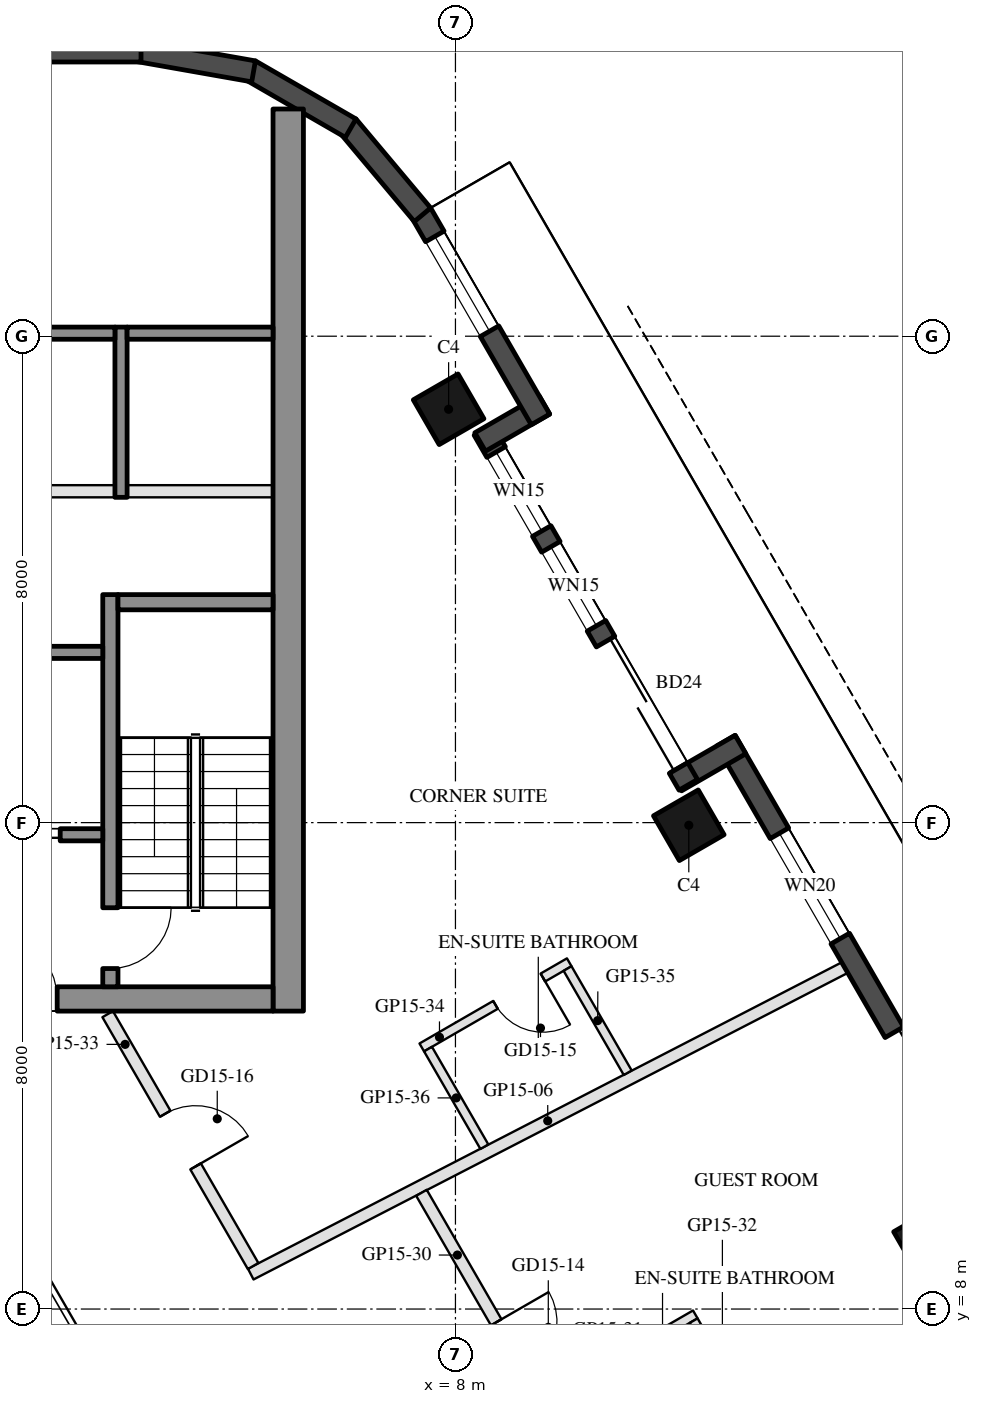
"""IFC4 building model, lengths in metres.
Left out: names, types, materials, properties, quantities, classifications, styles, units other than length and angle.
Written with IfcOpenShell. Run it as: python <this file> out.ifc"""

import sys

from ifc_helpers import new_model, si_unit, direction, frame, frame_2d, origin, origin_2d, place, context, subcontext, project, spatial, rectangle, hollow_rectangle, extrude, element, fill, save


model = new_model("IFC4")
c1 = context("Model", 3, precision=1e-05, world=origin(), true_north=direction((0.0, 1.0)))
c2 = subcontext(c1, "Body", "Model", "MODEL_VIEW")
j1 = project(units=[si_unit("LENGTHUNIT", "METRE"), si_unit("PLANEANGLEUNIT", "RADIAN")], contexts=[c1])
p1 = place(None, origin())
s1 = spatial("IfcSite", under=j1, at=p1, CompositionType="ELEMENT")
p2 = place(p1, origin())
s2 = spatial("IfcBuilding", under=s1, at=p2, CompositionType="ELEMENT")
p3 = place(p2, frame((0.0, 0.0, 172.5)))
s3 = spatial("IfcBuildingStorey", under=s2, at=p3, CompositionType="ELEMENT", Elevation=172.5)
for number, where, z_axis, x_axis in (
    (1, (15.788, 9.115, 0.0), (0.0, 0.0, 1.0), (-0.5, 0.866, 0.0)),
    (2, (11.838, 15.957, 0.0), (0.0, 0.0, 1.0), (-0.5, 0.866, 0.0)),
    (3, (7.888, 22.798, 0.0), (0.0, 0.0, 1.0), (-0.5, 0.866, 0.0)),
):
    element("IfcColumn", number, at=place(p3, frame(where, z_axis=z_axis, x_axis=x_axis)), inside=s3, PredefinedType="COLUMN", context=c2, shape_type="SweptSolid", body=[
        extrude(hollow_rectangle(XDim=0.85, YDim=0.85, WallThickness=0.04, at=origin_2d()), origin(), (0.0, 0.0, 1.0), 3.7),
    ])
p4 = place(p3, frame((17.299, 8.948, 0.0), z_axis=(0.0, 0.0, 1.0), x_axis=(-0.500010041276, 0.866019606374, 0.0)))
e4 = element("IfcWall", 4, at=p4, inside=s3, PredefinedType="SOLIDWALL", context=c2, shape_type="SweptSolid", body=[
    extrude(rectangle(XDim=9.7, YDim=0.35, at=frame_2d((4.85, 0.0))), origin(), (0.0, 0.0, 1.0), 3.55),
])
p5 = place(p4, frame((1.762, 0.0, 0.0)))
e5 = element("IfcOpeningElement", 5, at=p5, cuts=e4, PredefinedType="OPENING", context=c2, shape_type="SweptSolid", body=[
    extrude(rectangle(XDim=2.4, YDim=2.4, at=frame_2d((1.2, 1.2))), frame((0.0, 0.185, 0.0), z_axis=(0.0, -1.0, 0.0), x_axis=(1.0, 0.0, 0.0)), (0.0, 0.0, 1.0), 0.37),
])
p6 = place(p4, frame((5.941, 0.0, 0.3)))
e6 = element("IfcOpeningElement", 6, at=p6, cuts=e4, PredefinedType="OPENING", context=c2, shape_type="SweptSolid", body=[
    extrude(rectangle(XDim=2.0, YDim=2.65, at=frame_2d((1.0, 1.325))), frame((0.0, 0.185, 0.0), z_axis=(0.0, -1.0, 0.0), x_axis=(1.0, 0.0, 0.0)), (0.0, 0.0, 1.0), 0.37),
])
p7 = place(p3, frame((12.688, 17.284, 0.0), z_axis=(0.0, 0.0, 1.0), x_axis=(-0.865955602162, -0.500120880472, 0.0)))
e7 = element("IfcWall", 7, at=p7, inside=s3, PredefinedType="SOLIDWALL", context=c2, shape_type="SweptSolid", body=[
    extrude(rectangle(XDim=1.22, YDim=0.35, at=frame_2d((0.61, 0.0))), origin(), (0.0, 0.0, 1.0), 3.55),
])
p8 = place(p3, frame((11.829, 16.621, 0.0), z_axis=(0.0, 0.0, 1.0), x_axis=(-0.500003597184, 0.866023326939, 0.0)))
e8 = element("IfcWall", 8, at=p8, inside=s3, PredefinedType="SOLIDWALL", context=c2, shape_type="SweptSolid", body=[
    extrude(rectangle(XDim=6.74, YDim=0.35, at=frame_2d((3.37, 0.0))), origin(), (0.0, 0.0, 1.0), 3.55),
])
p9 = place(p8, frame((0.32, 0.0, 0.0)))
e9 = element("IfcOpeningElement", 9, at=p9, cuts=e8, PredefinedType="OPENING", context=c2, shape_type="SweptSolid", body=[
    extrude(rectangle(XDim=2.4, YDim=2.4, at=frame_2d((1.2, 1.2))), frame((0.0, 0.185, 0.0), z_axis=(0.0, -1.0, 0.0), x_axis=(1.0, 0.0, 0.0)), (0.0, 0.0, 1.0), 0.37),
])
p10 = place(p8, frame((3.02, 0.0, 0.3)))
e10 = element("IfcOpeningElement", 10, at=p10, cuts=e8, PredefinedType="OPENING", context=c2, shape_type="SweptSolid", body=[
    extrude(rectangle(XDim=1.5, YDim=2.65, at=frame_2d((0.75, 1.325))), frame((0.0, 0.185, 0.0), z_axis=(0.0, -1.0, 0.0), x_axis=(1.0, 0.0, 0.0)), (0.0, 0.0, 1.0), 0.37),
])
p11 = place(p8, frame((4.82, 0.0, 0.3)))
e11 = element("IfcOpeningElement", 11, at=p11, cuts=e8, PredefinedType="OPENING", context=c2, shape_type="SweptSolid", body=[
    extrude(rectangle(XDim=1.5, YDim=2.65, at=frame_2d((0.75, 1.325))), frame((0.0, 0.185, 0.0), z_axis=(0.0, -1.0, 0.0), x_axis=(1.0, 0.0, 0.0)), (0.0, 0.0, 1.0), 0.37),
])
p12 = place(p3, frame((8.406, 22.26, 0.0), z_axis=(0.0, 0.0, 1.0), x_axis=(0.865955602162, 0.500120880472, 0.0)))
e12 = element("IfcWall", 12, at=p12, inside=s3, PredefinedType="SOLIDWALL", context=c2, shape_type="SweptSolid", body=[
    extrude(rectangle(XDim=1.22, YDim=0.35, at=frame_2d((0.61, 0.0))), origin(), (0.0, 0.0, 1.0), 3.55),
])
p13 = place(p3, frame((9.398, 22.631, 0.0), z_axis=(0.0, 0.0, 1.0), x_axis=(-0.499954521343, 0.866051659307, 0.0)))
e13 = element("IfcWall", 13, at=p13, inside=s3, PredefinedType="SOLIDWALL", context=c2, shape_type="SweptSolid", body=[
    extrude(rectangle(XDim=3.916, YDim=0.35, at=frame_2d((1.958, 0.0))), origin(), (0.0, 0.0, 1.0), 3.55),
])
p14 = place(p13, frame((1.675, 0.0, 0.3)))
e14 = element("IfcOpeningElement", 14, at=p14, cuts=e13, PredefinedType="OPENING", context=c2, shape_type="SweptSolid", body=[
    extrude(rectangle(XDim=1.8, YDim=2.65, at=frame_2d((0.9, 1.325))), frame((0.0, 0.185, 0.0), z_axis=(0.0, -1.0, 0.0), x_axis=(1.0, 0.0, 0.0)), (0.0, 0.0, 1.0), 0.37),
])
p15 = place(p3, frame((7.458, 25.998, 0.0), z_axis=(0.0, 0.0, 1.0), x_axis=(-0.642808304945, 0.766027077259, 0.0)))
e15 = element("IfcWall", 15, at=p15, inside=s3, PredefinedType="SOLIDWALL", context=c2, shape_type="SweptSolid", body=[
    extrude(rectangle(XDim=1.91, YDim=0.35, at=frame_2d((0.955, 0.0))), origin(), (0.0, 0.0, 1.0), 3.55),
])
for number, where, z_axis, x_axis in (
    (16, (6.277, 27.422, 0.0), (0.0, 0.0, 1.0), (-0.866, 0.5, 0.0)),
    (17, (4.68, 28.356, 0.0), (0.0, 0.0, 1.0), (-0.985, 0.174, 0.0)),
):
    element("IfcWall", number, at=place(p3, frame(where, z_axis=z_axis, x_axis=x_axis)), inside=s3, PredefinedType="SOLIDWALL", context=c2, shape_type="SweptSolid", body=[
        extrude(rectangle(XDim=1.91, YDim=0.35, at=frame_2d((0.955, 0.0))), origin(), (0.0, 0.0, 1.0), 3.55),
    ])
p16 = place(p3, frame((2.829, 28.685, 0.0), z_axis=(0.0, 0.0, 1.0), x_axis=(-1.0, 0.0, 0.0)))
e18 = element("IfcWall", 18, at=p16, inside=s3, PredefinedType="SOLIDWALL", context=c2, shape_type="SweptSolid", body=[
    extrude(rectangle(XDim=5.658, YDim=0.35, at=frame_2d((2.829, 0.0))), origin(), (0.0, 0.0, 1.0), 3.55),
])
p17 = place(p3, frame((5.25, 12.9, 0.0), z_axis=(0.0, 0.0, 1.0), x_axis=(0.0, 1.0, 0.0)))
e19 = element("IfcWall", 19, at=p17, inside=s3, PredefinedType="SHEAR", context=c2, shape_type="SweptSolid", body=[
    extrude(rectangle(XDim=14.837, YDim=0.5, at=frame_2d((7.418, 0.0))), origin(), (0.0, 0.0, 1.0), 3.5),
])
p18 = place(p3, frame((5.0, 13.1, 0.0), z_axis=(0.0, 0.0, 1.0), x_axis=(-1.0, 0.0, 0.0)))
e20 = element("IfcWall", 20, at=p18, inside=s3, PredefinedType="SHEAR", context=c2, shape_type="SweptSolid", body=[
    extrude(rectangle(XDim=10.0, YDim=0.4, at=frame_2d((5.0, 0.0))), origin(), (0.0, 0.0, 1.0), 3.5),
])
p19 = place(p18, frame((3.55, 0.0, 0.0)))
e21 = element("IfcOpeningElement", 21, at=p19, cuts=e20, PredefinedType="OPENING", context=c2, shape_type="SweptSolid", body=[
    extrude(rectangle(XDim=1.1, YDim=2.1, at=frame_2d((0.55, 1.05))), frame((0.0, 0.21, 0.0), z_axis=(0.0, -1.0, 0.0), x_axis=(1.0, 0.0, 0.0)), (0.0, 0.0, 1.0), 0.42),
])
p20 = place(p18, frame((5.85, 0.0, 0.0)))
e22 = element("IfcOpeningElement", 22, at=p20, cuts=e20, PredefinedType="OPENING", context=c2, shape_type="SweptSolid", body=[
    extrude(rectangle(XDim=1.4, YDim=2.1, at=frame_2d((0.7, 1.05))), frame((0.0, 0.21, 0.0), z_axis=(0.0, -1.0, 0.0), x_axis=(1.0, 0.0, 0.0)), (0.0, 0.0, 1.0), 0.42),
])
p21 = place(p3, frame((2.325, 13.3, 0.0), z_axis=(0.0, 0.0, 1.0), x_axis=(0.0, 1.0, 0.0)))
e23 = element("IfcWall", 23, at=p21, inside=s3, PredefinedType="SHEAR", context=c2, shape_type="SweptSolid", body=[
    extrude(rectangle(XDim=6.45, YDim=0.25, at=frame_2d((3.225, 0.0))), origin(), (0.0, 0.0, 1.0), 3.5),
])
p22 = place(p21, frame((0.3, 0.0, 0.0)))
e24 = element("IfcOpeningElement", 24, at=p22, cuts=e23, PredefinedType="OPENING", context=c2, shape_type="SweptSolid", body=[
    extrude(rectangle(XDim=1.0, YDim=2.1, at=frame_2d((0.5, 1.05))), frame((0.0, 0.135, 0.0), z_axis=(0.0, -1.0, 0.0), x_axis=(1.0, 0.0, 0.0)), (0.0, 0.0, 1.0), 0.27),
])
p23 = place(p3, frame((5.0, 19.625, 0.0), z_axis=(0.0, 0.0, 1.0), x_axis=(-1.0, 0.0, 0.0)))
e25 = element("IfcWall", 25, at=p23, inside=s3, PredefinedType="SHEAR", context=c2, shape_type="SweptSolid", body=[
    extrude(rectangle(XDim=2.55, YDim=0.25, at=frame_2d((1.275, 0.0))), origin(), (0.0, 0.0, 1.0), 3.5),
])
p24 = place(p3, frame((2.2, 18.8, 0.0), z_axis=(0.0, 0.0, 1.0), x_axis=(-1.0, 0.0, 0.0)))
e26 = element("IfcWall", 26, at=p24, inside=s3, PredefinedType="SHEAR", context=c2, shape_type="SweptSolid", body=[
    extrude(rectangle(XDim=2.8, YDim=0.2, at=frame_2d((1.4, 0.0))), origin(), (0.0, 0.0, 1.0), 3.5),
])
p25 = place(p3, frame((2.2, 15.8, 0.0), z_axis=(0.0, 0.0, 1.0), x_axis=(-1.0, 0.0, 0.0)))
e27 = element("IfcWall", 27, at=p25, inside=s3, PredefinedType="SHEAR", context=c2, shape_type="SweptSolid", body=[
    extrude(rectangle(XDim=2.8, YDim=0.2, at=frame_2d((1.4, 0.0))), origin(), (0.0, 0.0, 1.0), 3.5),
])
p26 = place(p25, frame((0.7, 0.0, 0.0)))
e28 = element("IfcOpeningElement", 28, at=p26, cuts=e27, PredefinedType="OPENING", context=c2, shape_type="SweptSolid", body=[
    extrude(rectangle(XDim=1.2, YDim=2.1, at=frame_2d((0.6, 1.05))), frame((0.0, 0.11, 0.0), z_axis=(0.0, -1.0, 0.0), x_axis=(1.0, 0.0, 0.0)), (0.0, 0.0, 1.0), 0.22),
])
p27 = place(p3, frame((2.5, 21.35, 0.0), z_axis=(0.0, 0.0, 1.0), x_axis=(0.0, 1.0, 0.0)))
e29 = element("IfcWall", 29, at=p27, inside=s3, PredefinedType="SHEAR", context=c2, shape_type="SweptSolid", body=[
    extrude(rectangle(XDim=2.8, YDim=0.2, at=frame_2d((1.4, 0.0))), origin(), (0.0, 0.0, 1.0), 3.5),
])
p28 = place(p3, frame((5.0, 24.05, 0.0), z_axis=(0.0, 0.0, 1.0), x_axis=(-1.0, 0.0, 0.0)))
e30 = element("IfcWall", 30, at=p28, inside=s3, PredefinedType="SHEAR", context=c2, shape_type="SweptSolid", body=[
    extrude(rectangle(XDim=2.4, YDim=0.2, at=frame_2d((1.2, 0.0))), origin(), (0.0, 0.0, 1.0), 3.5),
])
p29 = place(p3, frame((2.4, 24.05, 0.0), z_axis=(0.0, 0.0, 1.0), x_axis=(-1.0, 0.0, 0.0)))
e31 = element("IfcWall", 31, at=p29, inside=s3, PredefinedType="SHEAR", context=c2, shape_type="SweptSolid", body=[
    extrude(rectangle(XDim=2.8, YDim=0.2, at=frame_2d((1.4, 0.0))), origin(), (0.0, 0.0, 1.0), 3.5),
])
p30 = place(p3, frame((5.0, 21.45, 0.0), z_axis=(0.0, 0.0, 1.0), x_axis=(-1.0, 0.0, 0.0)))
e32 = element("IfcWall", 32, at=p30, inside=s3, PredefinedType="PARTITIONING", context=c2, shape_type="SweptSolid", body=[
    extrude(rectangle(XDim=2.4, YDim=0.2, at=frame_2d((1.2, 0.0))), origin(), (0.0, 0.0, 1.0), 3.5),
])
p31 = place(p3, frame((2.4, 21.45, 0.0), z_axis=(0.0, 0.0, 1.0), x_axis=(-1.0, 0.0, 0.0)))
e33 = element("IfcWall", 33, at=p31, inside=s3, PredefinedType="PARTITIONING", context=c2, shape_type="SweptSolid", body=[
    extrude(rectangle(XDim=2.8, YDim=0.2, at=frame_2d((1.4, 0.0))), origin(), (0.0, 0.0, 1.0), 3.5),
])
p32 = place(p3, frame((16.543, 8.106, 0.0), z_axis=(0.0, 0.0, 1.0), x_axis=(-0.873587451419, -0.486667201199, 0.0)))
e34 = element("IfcWall", 34, at=p32, inside=s3, PredefinedType="PARTITIONING", context=c2, shape_type="SweptSolid", body=[
    extrude(rectangle(XDim=7.081, YDim=0.2, at=frame_2d((3.541, 0.0))), origin(), (0.0, 0.0, 1.0), 3.06),
])
p33 = place(p3, frame((14.402, 13.615, 0.0), z_axis=(0.0, 0.0, 1.0), x_axis=(-0.888691893785, -0.458504872299, 0.0)))
e35 = element("IfcWall", 35, at=p33, inside=s3, PredefinedType="PARTITIONING", context=c2, shape_type="SweptSolid", body=[
    extrude(rectangle(XDim=10.992, YDim=0.2, at=frame_2d((5.496, 0.0))), origin(), (0.0, 0.0, 1.0), 3.06),
])
p34 = place(p3, frame((7.441, 9.911, 0.0), z_axis=(0.0, 0.0, 1.0), x_axis=(0.500006275671, -0.866021780494, 0.0)))
e36 = element("IfcWall", 36, at=p34, inside=s3, PredefinedType="PARTITIONING", context=c2, shape_type="SweptSolid", body=[
    extrude(rectangle(XDim=5.907, YDim=0.2, at=frame_2d((2.954, 0.0))), origin(), (0.0, 0.0, 1.0), 2.95),
])
p35 = place(p34, frame((2.458, 0.0, 0.0)))
e37 = element("IfcOpeningElement", 37, at=p35, cuts=e36, PredefinedType="OPENING", context=c2, shape_type="SweptSolid", body=[
    extrude(rectangle(XDim=1.0, YDim=2.1, at=frame_2d((0.5, 1.05))), frame((0.0, 0.11, 0.0), z_axis=(0.0, -1.0, 0.0), x_axis=(1.0, 0.0, 0.0)), (0.0, 0.0, 1.0), 0.22),
])
p36 = place(p3, frame((11.945, 7.911, 0.0), z_axis=(0.0, 0.0, 1.0), x_axis=(-0.865996816683, -0.500049511043, 0.0)))
e38 = element("IfcWall", 38, at=p36, inside=s3, PredefinedType="PARTITIONING", context=c2, shape_type="SweptSolid", body=[
    extrude(rectangle(XDim=2.8, YDim=0.15, at=frame_2d((1.4, 0.0))), origin(), (0.0, 0.0, 1.0), 3.55),
])
p37 = place(p36, frame((0.5, 0.0, 0.0)))
e39 = element("IfcOpeningElement", 39, at=p37, cuts=e38, PredefinedType="OPENING", context=c2, shape_type="SweptSolid", body=[
    extrude(rectangle(XDim=0.9, YDim=2.1, at=frame_2d((0.45, 1.05))), frame((0.0, 0.085, 0.0), z_axis=(0.0, -1.0, 0.0), x_axis=(1.0, 0.0, 0.0)), (0.0, 0.0, 1.0), 0.17),
])
p38 = place(p3, frame((12.863, 6.171, 0.0), z_axis=(0.0, 0.0, 1.0), x_axis=(-0.499998034377, 0.866026538634, 0.0)))
e40 = element("IfcWall", 40, at=p38, inside=s3, PredefinedType="PARTITIONING", context=c2, shape_type="SweptSolid", body=[
    extrude(rectangle(XDim=1.892, YDim=0.15, at=frame_2d((0.946, 0.0))), origin(), (0.0, 0.0, 1.0), 2.95),
])
p39 = place(p3, frame((2.281, 12.85, 0.0), z_axis=(0.0, 0.0, 1.0), x_axis=(0.499981649923, -0.866035997947, 0.0)))
e41 = element("IfcWall", 41, at=p39, inside=s3, PredefinedType="PARTITIONING", context=c2, shape_type="SweptSolid", body=[
    extrude(rectangle(XDim=4.783, YDim=0.2, at=frame_2d((2.392, 0.0))), origin(), (0.0, 0.0, 1.0), 2.95),
])
p40 = place(p39, frame((1.892, 0.0, 0.0)))
e42 = element("IfcOpeningElement", 42, at=p40, cuts=e41, PredefinedType="OPENING", context=c2, shape_type="SweptSolid", body=[
    extrude(rectangle(XDim=1.0, YDim=2.1, at=frame_2d((0.5, 1.05))), frame((0.0, 0.11, 0.0), z_axis=(0.0, -1.0, 0.0), x_axis=(1.0, 0.0, 0.0)), (0.0, 0.0, 1.0), 0.22),
])
p41 = place(p3, frame((9.871, 13.702, 0.0), z_axis=(0.0, 0.0, 1.0), x_axis=(-0.866034573852, -0.49998411664, 0.0)))
e43 = element("IfcWall", 43, at=p41, inside=s3, PredefinedType="PARTITIONING", context=c2, shape_type="SweptSolid", body=[
    extrude(rectangle(XDim=2.8, YDim=0.15, at=frame_2d((1.4, 0.0))), origin(), (0.0, 0.0, 1.0), 3.55),
])
p42 = place(p41, frame((0.5, 0.0, 0.0)))
e44 = element("IfcOpeningElement", 44, at=p42, cuts=e43, PredefinedType="OPENING", context=c2, shape_type="SweptSolid", body=[
    extrude(rectangle(XDim=0.9, YDim=2.1, at=frame_2d((0.45, 1.05))), frame((0.0, 0.085, 0.0), z_axis=(0.0, -1.0, 0.0), x_axis=(1.0, 0.0, 0.0)), (0.0, 0.0, 1.0), 0.17),
])
p43 = place(p3, frame((10.833, 11.886, 0.0), z_axis=(0.0, 0.0, 1.0), x_axis=(-0.500000102728, 0.866025344474, 0.0)))
e45 = element("IfcWall", 45, at=p43, inside=s3, PredefinedType="PARTITIONING", context=c2, shape_type="SweptSolid", body=[
    extrude(rectangle(XDim=1.979, YDim=0.15, at=frame_2d((0.99, 0.0))), origin(), (0.0, 0.0, 1.0), 3.55),
])
p44 = place(p3, frame((8.476, 10.67, 0.0), z_axis=(0.0, 0.0, 1.0), x_axis=(-0.499992292652, 0.866029853578, 0.0)))
e46 = element("IfcWall", 46, at=p44, inside=s3, PredefinedType="PARTITIONING", context=c2, shape_type="SweptSolid", body=[
    extrude(rectangle(XDim=1.854, YDim=0.15, at=frame_2d((0.927, 0.0))), origin(), (0.0, 0.0, 1.0), 3.55),
])
p45 = place(p5, frame((2.4, 0.0, 0.0), z_axis=(0.0, 0.0, 1.0), x_axis=(-1.0, 0.0, 0.0)))
e47 = element("IfcDoor", 47, at=p45, inside=s3, OperationType="SLIDING_TO_LEFT", PredefinedType="DOOR", context=c2, shape_type="SweptSolid", body=[
    extrude(rectangle(XDim=2.4, YDim=2.4, at=frame_2d((1.2, 1.2))), frame((0.0, 0.025, 0.0), z_axis=(0.0, -1.0, 0.0), x_axis=(1.0, 0.0, 0.0)), (0.0, 0.0, 1.0), 0.05),
])
fill(e5, e47)
p46 = place(p6, origin())
e48 = element("IfcWindow", 48, at=p46, inside=s3, PartitioningType="SINGLE_PANEL", PredefinedType="WINDOW", context=c2, shape_type="SweptSolid", body=[
    extrude(rectangle(XDim=2.0, YDim=2.65, at=frame_2d((1.0, 1.325))), frame((0.0, 0.03, 0.0), z_axis=(0.0, -1.0, 0.0), x_axis=(1.0, 0.0, 0.0)), (0.0, 0.0, 1.0), 0.06),
])
fill(e6, e48)
p47 = place(p9, frame((2.4, 0.0, 0.0), z_axis=(0.0, 0.0, 1.0), x_axis=(-1.0, 0.0, 0.0)))
e49 = element("IfcDoor", 49, at=p47, inside=s3, OperationType="SLIDING_TO_LEFT", PredefinedType="DOOR", context=c2, shape_type="SweptSolid", body=[
    extrude(rectangle(XDim=2.4, YDim=2.4, at=frame_2d((1.2, 1.2))), frame((0.0, 0.025, 0.0), z_axis=(0.0, -1.0, 0.0), x_axis=(1.0, 0.0, 0.0)), (0.0, 0.0, 1.0), 0.05),
])
fill(e9, e49)
p48 = place(p10, origin())
e50 = element("IfcWindow", 50, at=p48, inside=s3, PartitioningType="SINGLE_PANEL", PredefinedType="WINDOW", context=c2, shape_type="SweptSolid", body=[
    extrude(rectangle(XDim=1.5, YDim=2.65, at=frame_2d((0.75, 1.325))), frame((0.0, 0.03, 0.0), z_axis=(0.0, -1.0, 0.0), x_axis=(1.0, 0.0, 0.0)), (0.0, 0.0, 1.0), 0.06),
])
fill(e10, e50)
p49 = place(p11, origin())
e51 = element("IfcWindow", 51, at=p49, inside=s3, PartitioningType="SINGLE_PANEL", PredefinedType="WINDOW", context=c2, shape_type="SweptSolid", body=[
    extrude(rectangle(XDim=1.5, YDim=2.65, at=frame_2d((0.75, 1.325))), frame((0.0, 0.03, 0.0), z_axis=(0.0, -1.0, 0.0), x_axis=(1.0, 0.0, 0.0)), (0.0, 0.0, 1.0), 0.06),
])
fill(e11, e51)
p50 = place(p14, origin())
e52 = element("IfcWindow", 52, at=p50, inside=s3, PartitioningType="SINGLE_PANEL", PredefinedType="WINDOW", context=c2, shape_type="SweptSolid", body=[
    extrude(rectangle(XDim=1.8, YDim=2.65, at=frame_2d((0.9, 1.325))), frame((0.0, 0.03, 0.0), z_axis=(0.0, -1.0, 0.0), x_axis=(1.0, 0.0, 0.0)), (0.0, 0.0, 1.0), 0.06),
])
fill(e14, e52)
p51 = place(p26, origin())
e53 = element("IfcDoor", 53, at=p51, inside=s3, OperationType="DOUBLE_DOOR_SLIDING", PredefinedType="DOOR", context=c2, shape_type="SweptSolid", body=[
    extrude(rectangle(XDim=1.2, YDim=2.1, at=frame_2d((0.6, 1.05))), frame((0.0, 0.025, 0.0), z_axis=(0.0, -1.0, 0.0), x_axis=(1.0, 0.0, 0.0)), (0.0, 0.0, 1.0), 0.05),
])
fill(e28, e53)
p52 = place(p19, frame((1.1, 0.0, 0.0), z_axis=(0.0, 0.0, 1.0), x_axis=(-1.0, 0.0, 0.0)))
e54 = element("IfcDoor", 54, at=p52, inside=s3, OperationType="SINGLE_SWING_LEFT", PredefinedType="DOOR", context=c2, shape_type="SweptSolid", body=[
    extrude(rectangle(XDim=1.1, YDim=2.1, at=frame_2d((0.55, 1.05))), frame((0.0, 0.025, 0.0), z_axis=(0.0, -1.0, 0.0), x_axis=(1.0, 0.0, 0.0)), (0.0, 0.0, 1.0), 0.05),
])
fill(e21, e54)
p53 = place(p22, frame((1.0, 0.0, 0.0), z_axis=(0.0, 0.0, 1.0), x_axis=(-1.0, 0.0, 0.0)))
e55 = element("IfcDoor", 55, at=p53, inside=s3, OperationType="SINGLE_SWING_LEFT", PredefinedType="DOOR", context=c2, shape_type="SweptSolid", body=[
    extrude(rectangle(XDim=1.0, YDim=2.1, at=frame_2d((0.5, 1.05))), frame((0.0, 0.025, 0.0), z_axis=(0.0, -1.0, 0.0), x_axis=(1.0, 0.0, 0.0)), (0.0, 0.0, 1.0), 0.05),
])
fill(e24, e55)
p54 = place(p35, origin())
e56 = element("IfcDoor", 56, at=p54, inside=s3, OperationType="SINGLE_SWING_LEFT", PredefinedType="DOOR", context=c2, shape_type="SweptSolid", body=[
    extrude(rectangle(XDim=1.0, YDim=2.1, at=frame_2d((0.5, 1.05))), frame((0.0, 0.025, 0.0), z_axis=(0.0, -1.0, 0.0), x_axis=(1.0, 0.0, 0.0)), (0.0, 0.0, 1.0), 0.05),
])
fill(e37, e56)
p55 = place(p42, origin())
e57 = element("IfcDoor", 57, at=p55, inside=s3, OperationType="SINGLE_SWING_LEFT", PredefinedType="DOOR", context=c2, shape_type="SweptSolid", body=[
    extrude(rectangle(XDim=0.9, YDim=2.1, at=frame_2d((0.45, 1.05))), frame((0.0, 0.025, 0.0), z_axis=(0.0, -1.0, 0.0), x_axis=(1.0, 0.0, 0.0)), (0.0, 0.0, 1.0), 0.05),
])
fill(e44, e57)
p56 = place(p40, origin())
e58 = element("IfcDoor", 58, at=p56, inside=s3, OperationType="SINGLE_SWING_RIGHT", PredefinedType="DOOR", context=c2, shape_type="SweptSolid", body=[
    extrude(rectangle(XDim=1.0, YDim=2.1, at=frame_2d((0.5, 1.05))), frame((0.0, 0.025, 0.0), z_axis=(0.0, -1.0, 0.0), x_axis=(1.0, 0.0, 0.0)), (0.0, 0.0, 1.0), 0.05),
])
fill(e42, e58)
save(model, sys.argv[1])
